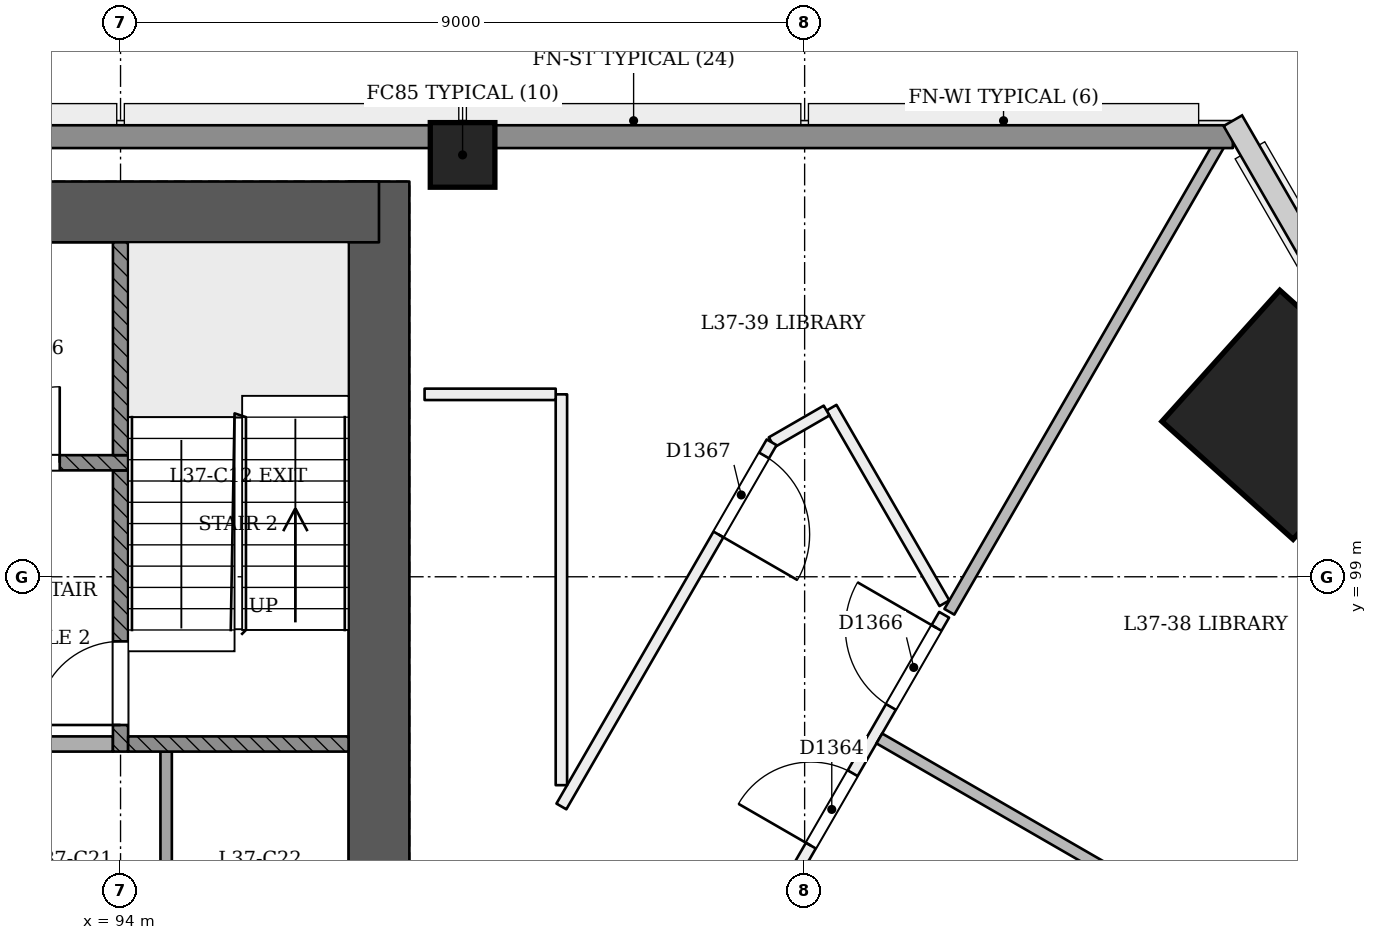
"""IFC4 building model, lengths in metres.
Left out: names, types, materials, properties, quantities, classifications, styles, units other than length and angle.
Written with IfcOpenShell. Run it as: python <this file> out.ifc"""

import sys

from ifc_helpers import new_model, si_unit, direction, frame, frame_2d, origin, origin_2d, place, context, subcontext, project, spatial, rectangle, extrude, element, fill, save


model = new_model("IFC4")
c1 = context("Model", 3, precision=1e-05, world=origin(), true_north=direction((0.0, 1.0)))
c2 = subcontext(c1, "Body", "Model", "MODEL_VIEW")
j1 = project(units=[si_unit("LENGTHUNIT", "METRE"), si_unit("PLANEANGLEUNIT", "RADIAN")], contexts=[c1])
p1 = place(None, origin())
s1 = spatial("IfcSite", under=j1, at=p1, CompositionType="ELEMENT")
p2 = place(p1, origin())
s2 = spatial("IfcBuilding", under=s1, at=p2, CompositionType="ELEMENT")
p3 = place(p2, frame((0.0, 0.0, 145.8)))
s3 = spatial("IfcBuildingStorey", under=s2, at=p3, CompositionType="ELEMENT", Elevation=145.8)
p4 = place(p3, frame((97.4, 93.0, 0.0), z_axis=(0.0, 0.0, 1.0), x_axis=(0.0, 1.0, 0.0)))
e1 = element("IfcWall", 1, at=p4, inside=s3, PredefinedType="SHEAR", context=c2, shape_type="SweptSolid", body=[
    extrude(rectangle(XDim=11.2, YDim=0.8, at=frame_2d((5.6, 0.0))), origin(), (0.0, 0.0, 1.0), 3.6),
])
p5 = place(p3, frame((97.4, 103.8, 0.0), z_axis=(0.0, 0.0, 1.0), x_axis=(-1.0, 0.0, 0.0)))
e2 = element("IfcWall", 2, at=p5, inside=s3, PredefinedType="SHEAR", context=c2, shape_type="SweptSolid", body=[
    extrude(rectangle(XDim=25.2, YDim=0.8, at=frame_2d((12.6, 0.0))), origin(), (0.0, 0.0, 1.0), 3.6),
])
p6 = place(p3, frame((109.373, 101.12, 0.0), z_axis=(-0.028403721265, 0.009287135593, 0.999553389135), x_axis=(0.498883801201, -0.866383831898, 0.022226307065)))
e3 = element("IfcColumn", 3, at=p6, inside=s3, PredefinedType="COLUMN", context=c2, shape_type="SweptSolid", body=[
    extrude(rectangle(XDim=2.32, YDim=2.32, at=origin_2d()), origin(), (0.0, 0.0, 1.0), 3.602),
])
p7 = place(p3, frame((98.5, 104.55, 0.0), z_axis=(0.0, 0.0, 1.0), x_axis=(1.0, 0.0, 0.0)))
e4 = element("IfcColumn", 4, at=p7, inside=s3, PredefinedType="COLUMN", context=c2, shape_type="SweptSolid", body=[
    extrude(rectangle(XDim=0.85, YDim=0.85, at=origin_2d()), origin(), (0.0, 0.0, 1.0), 3.6),
])
p8 = place(p3, frame((85.0, 64.144, 0.0), z_axis=(0.0, 0.0, 1.0), x_axis=(0.50000053273, 0.866025096212, 0.0)))
e5 = element("IfcWall", 5, at=p8, inside=s3, PredefinedType="PARTITIONING", context=c2, shape_type="SweptSolid", body=[
    extrude(rectangle(XDim=39.671, YDim=0.15, at=frame_2d((19.835, 0.0))), origin(), (0.0, 0.0, 1.0), 2.75),
])
p9 = place(p8, frame((0.618, 0.0, 0.0)))
e6 = element("IfcOpeningElement", 6, at=p9, cuts=e5, PredefinedType="OPENING", context=c2, shape_type="SweptSolid", body=[
    extrude(rectangle(XDim=1.2, YDim=2.1, at=frame_2d((0.6, 1.05))), frame((0.0, 0.085, 0.0), z_axis=(0.0, -1.0, 0.0), x_axis=(1.0, 0.0, 0.0)), (0.0, 0.0, 1.0), 0.171),
])
p10 = place(p8, frame((9.115, 0.0, 0.0)))
e7 = element("IfcOpeningElement", 7, at=p10, cuts=e5, PredefinedType="OPENING", context=c2, shape_type="SweptSolid", body=[
    extrude(rectangle(XDim=1.0, YDim=2.1, at=frame_2d((0.5, 1.05))), frame((0.0, 0.085, 0.0), z_axis=(0.0, -1.0, 0.0), x_axis=(1.0, 0.0, 0.0)), (0.0, 0.0, 1.0), 0.171),
])
p11 = place(p8, frame((11.556, 0.0, 0.0)))
e8 = element("IfcOpeningElement", 8, at=p11, cuts=e5, PredefinedType="OPENING", context=c2, shape_type="SweptSolid", body=[
    extrude(rectangle(XDim=1.0, YDim=2.1, at=frame_2d((0.5, 1.05))), frame((0.0, 0.085, 0.0), z_axis=(0.0, -1.0, 0.0), x_axis=(1.0, 0.0, 0.0)), (0.0, 0.0, 1.0), 0.171),
])
p12 = place(p8, frame((18.115, 0.0, 0.0)))
e9 = element("IfcOpeningElement", 9, at=p12, cuts=e5, PredefinedType="OPENING", context=c2, shape_type="SweptSolid", body=[
    extrude(rectangle(XDim=1.0, YDim=2.1, at=frame_2d((0.5, 1.05))), frame((0.0, 0.085, 0.0), z_axis=(0.0, -1.0, 0.0), x_axis=(1.0, 0.0, 0.0)), (0.0, 0.0, 1.0), 0.171),
])
p13 = place(p8, frame((20.556, 0.0, 0.0)))
e10 = element("IfcOpeningElement", 10, at=p13, cuts=e5, PredefinedType="OPENING", context=c2, shape_type="SweptSolid", body=[
    extrude(rectangle(XDim=1.0, YDim=2.1, at=frame_2d((0.5, 1.05))), frame((0.0, 0.085, 0.0), z_axis=(0.0, -1.0, 0.0), x_axis=(1.0, 0.0, 0.0)), (0.0, 0.0, 1.0), 0.171),
])
p14 = place(p8, frame((27.115, 0.0, 0.0)))
e11 = element("IfcOpeningElement", 11, at=p14, cuts=e5, PredefinedType="OPENING", context=c2, shape_type="SweptSolid", body=[
    extrude(rectangle(XDim=1.0, YDim=2.1, at=frame_2d((0.5, 1.05))), frame((0.0, 0.085, 0.0), z_axis=(0.0, -1.0, 0.0), x_axis=(1.0, 0.0, 0.0)), (0.0, 0.0, 1.0), 0.171),
])
p15 = place(p8, frame((30.585, 0.0, 0.0)))
e12 = element("IfcOpeningElement", 12, at=p15, cuts=e5, PredefinedType="OPENING", context=c2, shape_type="SweptSolid", body=[
    extrude(rectangle(XDim=1.0, YDim=2.1, at=frame_2d((0.5, 1.05))), frame((0.0, 0.085, 0.0), z_axis=(0.0, -1.0, 0.0), x_axis=(1.0, 0.0, 0.0)), (0.0, 0.0, 1.0), 0.171),
])
p16 = place(p8, frame((36.164, 0.0, 0.0)))
e13 = element("IfcOpeningElement", 13, at=p16, cuts=e5, PredefinedType="OPENING", context=c2, shape_type="SweptSolid", body=[
    extrude(rectangle(XDim=1.1, YDim=2.1, at=frame_2d((0.55, 1.05))), frame((0.0, 0.085, 0.0), z_axis=(0.0, -1.0, 0.0), x_axis=(1.0, 0.0, 0.0)), (0.0, 0.0, 1.0), 0.171),
])
p17 = place(p8, frame((38.271, 0.0, 0.0)))
e14 = element("IfcOpeningElement", 14, at=p17, cuts=e5, PredefinedType="OPENING", context=c2, shape_type="SweptSolid", body=[
    extrude(rectangle(XDim=1.2, YDim=2.1, at=frame_2d((0.6, 1.05))), frame((0.0, 0.085, 0.0), z_axis=(0.0, -1.0, 0.0), x_axis=(1.0, 0.0, 0.0)), (0.0, 0.0, 1.0), 0.171),
])
p18 = place(p3, frame((104.839, 98.652, 0.0), z_axis=(0.0, 0.0, 1.0), x_axis=(-0.500002315714, 0.866024066802, 0.0)))
e15 = element("IfcWall", 15, at=p18, inside=s3, PredefinedType="PARTITIONING", context=c2, shape_type="SweptSolid", body=[
    extrude(rectangle(XDim=2.97, YDim=0.15, at=frame_2d((1.485, 0.0))), origin(), (0.0, 0.0, 1.0), 3.15),
])
p19 = place(p3, frame((103.289, 101.187, 0.0), z_axis=(0.0, 0.0, 1.0), x_axis=(-0.866019930389, -0.500009480079, 0.0)))
e16 = element("IfcWall", 16, at=p19, inside=s3, PredefinedType="PARTITIONING", context=c2, shape_type="SweptSolid", body=[
    extrude(rectangle(XDim=0.834, YDim=0.15, at=frame_2d((0.417, 0.0))), origin(), (0.0, 0.0, 1.0), 3.15),
])
p20 = place(p3, frame((102.566, 100.769, 0.0), z_axis=(0.0, 0.0, 1.0), x_axis=(-0.500002592159, -0.866023907196, 0.0)))
e17 = element("IfcWall", 17, at=p20, inside=s3, PredefinedType="PARTITIONING", context=c2, shape_type="SweptSolid", body=[
    extrude(rectangle(XDim=5.532, YDim=0.15, at=frame_2d((2.766, 0.0))), origin(), (0.0, 0.0, 1.0), 3.15),
])
p21 = place(p20, frame((0.2, 0.0, 0.0)))
e18 = element("IfcOpeningElement", 18, at=p21, cuts=e17, PredefinedType="OPENING", context=c2, shape_type="SweptSolid", body=[
    extrude(rectangle(XDim=1.2, YDim=2.1, at=frame_2d((0.6, 1.05))), frame((0.0, 0.085, 0.0), z_axis=(0.0, -1.0, 0.0), x_axis=(1.0, 0.0, 0.0)), (0.0, 0.0, 1.0), 0.171),
])
p22 = place(p3, frame((99.8, 96.258, 0.0), z_axis=(0.0, 0.0, 1.0), x_axis=(0.0, 1.0, 0.0)))
e19 = element("IfcWall", 19, at=p22, inside=s3, PredefinedType="PARTITIONING", context=c2, shape_type="SweptSolid", body=[
    extrude(rectangle(XDim=5.142, YDim=0.15, at=frame_2d((2.571, 0.0))), origin(), (0.0, 0.0, 1.0), 3.15),
])
p23 = place(p3, frame((99.725, 101.4, 0.0), z_axis=(0.0, 0.0, 1.0), x_axis=(-1.0, 0.0, 0.0)))
e20 = element("IfcWall", 20, at=p23, inside=s3, PredefinedType="PARTITIONING", context=c2, shape_type="SweptSolid", body=[
    extrude(rectangle(XDim=1.725, YDim=0.15, at=frame_2d((0.863, 0.0))), origin(), (0.0, 0.0, 1.0), 3.15),
])
p24 = place(p3, frame((103.033, 95.228, 0.0), z_axis=(0.0, 0.0, 1.0), x_axis=(0.866032454348, -0.499987787867, 0.0)))
e21 = element("IfcWall", 21, at=p24, inside=s3, PredefinedType="PARTITIONING", context=c2, shape_type="SweptSolid", body=[
    extrude(rectangle(XDim=3.425, YDim=0.1, at=frame_2d((1.712, 0.0))), origin(), (0.0, 0.0, 1.0), 3.15),
])
p25 = place(p24, frame((1.225, 0.0, 0.0)))
e22 = element("IfcOpeningElement", 22, at=p25, cuts=e21, PredefinedType="OPENING", context=c2, shape_type="SweptSolid", body=[
    extrude(rectangle(XDim=0.9, YDim=2.1, at=frame_2d((0.45, 1.05))), frame((0.0, 0.061, 0.0), z_axis=(0.0, -1.0, 0.0), x_axis=(1.0, 0.0, 0.0)), (0.0, 0.0, 1.0), 0.121),
])
p26 = place(p3, frame((109.478, 93.7, 0.0), z_axis=(0.0, 0.0, 1.0), x_axis=(-0.866025401434, 0.500000004071, 0.0)))
e23 = element("IfcWall", 23, at=p26, inside=s3, PredefinedType="PARTITIONING", context=c2, shape_type="SweptSolid", body=[
    extrude(rectangle(XDim=6.345, YDim=0.15, at=frame_2d((3.173, 0.0))), origin(), (0.0, 0.0, 1.0), 2.65),
])
p27 = place(p3, frame((108.576, 104.9, 0.0), z_axis=(0.0, 0.0, 1.0), x_axis=(-0.4999967785, -0.866027263711, 0.0)))
e24 = element("IfcWall", 24, at=p27, inside=s3, PredefinedType="PARTITIONING", context=c2, shape_type="SweptSolid", body=[
    extrude(rectangle(XDim=7.344, YDim=0.15, at=frame_2d((3.672, 0.0))), origin(), (0.0, 0.0, 1.0), 2.65),
])
p28 = place(p3, frame((61.366, 104.79, 0.0), z_axis=(0.0, 0.0, 1.0), x_axis=(1.0, 0.0, 0.0)))
e25 = element("IfcWall", 25, at=p28, inside=s3, PredefinedType="SOLIDWALL", context=c2, shape_type="SweptSolid", body=[
    extrude(rectangle(XDim=47.268, YDim=0.3, at=frame_2d((23.634, 0.0))), origin(), (0.0, 0.0, 1.0), 2.65),
])
p29 = place(p3, frame((94.6, 93.4, 0.0), z_axis=(0.0, 0.0, 1.0), x_axis=(0.0, 1.0, 0.0)))
e26 = element("IfcWall", 26, at=p29, inside=s3, PredefinedType="PARTITIONING", context=c2, shape_type="SweptSolid", body=[
    extrude(rectangle(XDim=3.3, YDim=0.15, at=frame_2d((1.65, 0.0))), origin(), (0.0, 0.0, 1.0), 3.15),
])
p30 = place(p3, frame((91.5, 96.8, 0.0), z_axis=(0.0, 0.0, 1.0), x_axis=(1.0, 0.0, 0.0)))
e27 = element("IfcWall", 27, at=p30, inside=s3, PredefinedType="PARTITIONING", context=c2, shape_type="SweptSolid", body=[
    extrude(rectangle(XDim=2.4, YDim=0.2, at=frame_2d((1.2, 0.0))), origin(), (0.0, 0.0, 1.0), 3.15),
])
p31 = place(p3, frame((94.0, 96.7, 0.0), z_axis=(0.0, 0.0, 1.0), x_axis=(0.0, 1.0, 0.0)))
e28 = element("IfcWall", 28, at=p31, inside=s3, PredefinedType="SOLIDWALL", context=c2, shape_type="SweptSolid", body=[
    extrude(rectangle(XDim=3.7, YDim=0.2, at=frame_2d((1.85, 0.0))), origin(), (0.0, 0.0, 1.0), 3.15),
])
p32 = place(p31, frame((0.35, 0.0, 0.0)))
e29 = element("IfcOpeningElement", 29, at=p32, cuts=e28, PredefinedType="OPENING", context=c2, shape_type="SweptSolid", body=[
    extrude(rectangle(XDim=1.1, YDim=2.1, at=frame_2d((0.55, 1.05))), frame((0.0, 0.11, 0.0), z_axis=(0.0, -1.0, 0.0), x_axis=(1.0, 0.0, 0.0)), (0.0, 0.0, 1.0), 0.221),
])
p33 = place(p3, frame((94.1, 96.8, 0.0), z_axis=(0.0, 0.0, 1.0), x_axis=(1.0, 0.0, 0.0)))
e30 = element("IfcWall", 30, at=p33, inside=s3, PredefinedType="SOLIDWALL", context=c2, shape_type="SweptSolid", body=[
    extrude(rectangle(XDim=2.9, YDim=0.2, at=frame_2d((1.45, 0.0))), origin(), (0.0, 0.0, 1.0), 3.15),
])
p34 = place(p3, frame((75.9, 100.5, 0.0), z_axis=(0.0, 0.0, 1.0), x_axis=(1.0, 0.0, 0.0)))
e31 = element("IfcWall", 31, at=p34, inside=s3, PredefinedType="SOLIDWALL", context=c2, shape_type="SweptSolid", body=[
    extrude(rectangle(XDim=18.2, YDim=0.2, at=frame_2d((9.1, 0.0))), origin(), (0.0, 0.0, 1.0), 3.15),
])
p35 = place(p34, frame((2.6, 0.0, 0.0)))
e32 = element("IfcOpeningElement", 32, at=p35, cuts=e31, PredefinedType="OPENING", context=c2, shape_type="SweptSolid", body=[
    extrude(rectangle(XDim=1.1, YDim=2.1, at=frame_2d((0.55, 1.05))), frame((0.0, 0.11, 0.0), z_axis=(0.0, -1.0, 0.0), x_axis=(1.0, 0.0, 0.0)), (0.0, 0.0, 1.0), 0.221),
])
p36 = place(p34, frame((4.5, 0.0, 0.0)))
e33 = element("IfcOpeningElement", 33, at=p36, cuts=e31, PredefinedType="OPENING", context=c2, shape_type="SweptSolid", body=[
    extrude(rectangle(XDim=1.1, YDim=2.1, at=frame_2d((0.55, 1.05))), frame((0.0, 0.11, 0.0), z_axis=(0.0, -1.0, 0.0), x_axis=(1.0, 0.0, 0.0)), (0.0, 0.0, 1.0), 0.221),
])
p37 = place(p34, frame((6.4, 0.0, 0.0)))
e34 = element("IfcOpeningElement", 34, at=p37, cuts=e31, PredefinedType="OPENING", context=c2, shape_type="SweptSolid", body=[
    extrude(rectangle(XDim=1.1, YDim=2.1, at=frame_2d((0.55, 1.05))), frame((0.0, 0.11, 0.0), z_axis=(0.0, -1.0, 0.0), x_axis=(1.0, 0.0, 0.0)), (0.0, 0.0, 1.0), 0.221),
])
p38 = place(p34, frame((8.3, 0.0, 0.0)))
e35 = element("IfcOpeningElement", 35, at=p38, cuts=e31, PredefinedType="OPENING", context=c2, shape_type="SweptSolid", body=[
    extrude(rectangle(XDim=1.1, YDim=2.1, at=frame_2d((0.55, 1.05))), frame((0.0, 0.11, 0.0), z_axis=(0.0, -1.0, 0.0), x_axis=(1.0, 0.0, 0.0)), (0.0, 0.0, 1.0), 0.221),
])
p39 = place(p34, frame((10.2, 0.0, 0.0)))
e36 = element("IfcOpeningElement", 36, at=p39, cuts=e31, PredefinedType="OPENING", context=c2, shape_type="SweptSolid", body=[
    extrude(rectangle(XDim=1.1, YDim=2.1, at=frame_2d((0.55, 1.05))), frame((0.0, 0.11, 0.0), z_axis=(0.0, -1.0, 0.0), x_axis=(1.0, 0.0, 0.0)), (0.0, 0.0, 1.0), 0.221),
])
p40 = place(p34, frame((12.1, 0.0, 0.0)))
e37 = element("IfcOpeningElement", 37, at=p40, cuts=e31, PredefinedType="OPENING", context=c2, shape_type="SweptSolid", body=[
    extrude(rectangle(XDim=1.1, YDim=2.1, at=frame_2d((0.55, 1.05))), frame((0.0, 0.11, 0.0), z_axis=(0.0, -1.0, 0.0), x_axis=(1.0, 0.0, 0.0)), (0.0, 0.0, 1.0), 0.221),
])
p41 = place(p34, frame((14.0, 0.0, 0.0)))
e38 = element("IfcOpeningElement", 38, at=p41, cuts=e31, PredefinedType="OPENING", context=c2, shape_type="SweptSolid", body=[
    extrude(rectangle(XDim=1.1, YDim=2.1, at=frame_2d((0.55, 1.05))), frame((0.0, 0.11, 0.0), z_axis=(0.0, -1.0, 0.0), x_axis=(1.0, 0.0, 0.0)), (0.0, 0.0, 1.0), 0.221),
])
p42 = place(p34, frame((0.65, 0.0, 0.0)))
e39 = element("IfcOpeningElement", 39, at=p42, cuts=e31, PredefinedType="OPENING", context=c2, shape_type="SweptSolid", body=[
    extrude(rectangle(XDim=1.0, YDim=2.1, at=frame_2d((0.5, 1.05))), frame((0.0, 0.11, 0.0), z_axis=(0.0, -1.0, 0.0), x_axis=(1.0, 0.0, 0.0)), (0.0, 0.0, 1.0), 0.221),
])
p43 = place(p34, frame((16.3, 0.0, 0.0)))
e40 = element("IfcOpeningElement", 40, at=p43, cuts=e31, PredefinedType="OPENING", context=c2, shape_type="SweptSolid", body=[
    extrude(rectangle(XDim=1.0, YDim=2.1, at=frame_2d((0.5, 1.05))), frame((0.0, 0.11, 0.0), z_axis=(0.0, -1.0, 0.0), x_axis=(1.0, 0.0, 0.0)), (0.0, 0.0, 1.0), 0.221),
])
p44 = place(p3, frame((94.0, 100.6, 0.0), z_axis=(0.0, 0.0, 1.0), x_axis=(0.0, 1.0, 0.0)))
e41 = element("IfcWall", 41, at=p44, inside=s3, PredefinedType="SOLIDWALL", context=c2, shape_type="SweptSolid", body=[
    extrude(rectangle(XDim=2.8, YDim=0.2, at=frame_2d((1.4, 0.0))), origin(), (0.0, 0.0, 1.0), 3.15),
])
p45 = place(p16, origin())
e42 = element("IfcDoor", 42, at=p45, inside=s3, OperationType="SINGLE_SWING_LEFT", PredefinedType="NOTDEFINED", context=c2, shape_type="SweptSolid", body=[
    extrude(rectangle(XDim=1.1, YDim=2.1, at=frame_2d((0.55, 1.05))), frame((0.0, 0.025, 0.0), z_axis=(0.0, -1.0, 0.0), x_axis=(1.0, 0.0, 0.0)), (0.0, 0.0, 1.0), 0.05),
])
fill(e13, e42)
p46 = place(p17, origin())
e43 = element("IfcDoor", 43, at=p46, inside=s3, OperationType="SINGLE_SWING_RIGHT", PredefinedType="NOTDEFINED", context=c2, shape_type="SweptSolid", body=[
    extrude(rectangle(XDim=1.2, YDim=2.1, at=frame_2d((0.6, 1.05))), frame((0.0, 0.025, 0.0), z_axis=(0.0, -1.0, 0.0), x_axis=(1.0, 0.0, 0.0)), (0.0, 0.0, 1.0), 0.05),
])
fill(e14, e43)
p47 = place(p21, origin())
e44 = element("IfcDoor", 44, at=p47, inside=s3, OperationType="SINGLE_SWING_RIGHT", PredefinedType="NOTDEFINED", context=c2, shape_type="SweptSolid", body=[
    extrude(rectangle(XDim=1.2, YDim=2.1, at=frame_2d((0.6, 1.05))), frame((0.0, 0.025, 0.0), z_axis=(0.0, -1.0, 0.0), x_axis=(1.0, 0.0, 0.0)), (0.0, 0.0, 1.0), 0.05),
])
fill(e18, e44)
p48 = place(p32, origin())
e45 = element("IfcDoor", 45, at=p48, inside=s3, OperationType="SINGLE_SWING_LEFT", PredefinedType="NOTDEFINED", context=c2, shape_type="SweptSolid", body=[
    extrude(rectangle(XDim=1.1, YDim=2.1, at=frame_2d((0.55, 1.05))), frame((0.0, 0.025, 0.0), z_axis=(0.0, -1.0, 0.0), x_axis=(1.0, 0.0, 0.0)), (0.0, 0.0, 1.0), 0.05),
])
fill(e29, e45)
p49 = place(p43, origin())
e46 = element("IfcDoor", 46, at=p49, inside=s3, OperationType="SINGLE_SWING_RIGHT", PredefinedType="NOTDEFINED", context=c2, shape_type="SweptSolid", body=[
    extrude(rectangle(XDim=1.0, YDim=2.1, at=frame_2d((0.5, 1.05))), frame((0.0, 0.025, 0.0), z_axis=(0.0, -1.0, 0.0), x_axis=(1.0, 0.0, 0.0)), (0.0, 0.0, 1.0), 0.05),
])
fill(e40, e46)
save(model, sys.argv[1])
